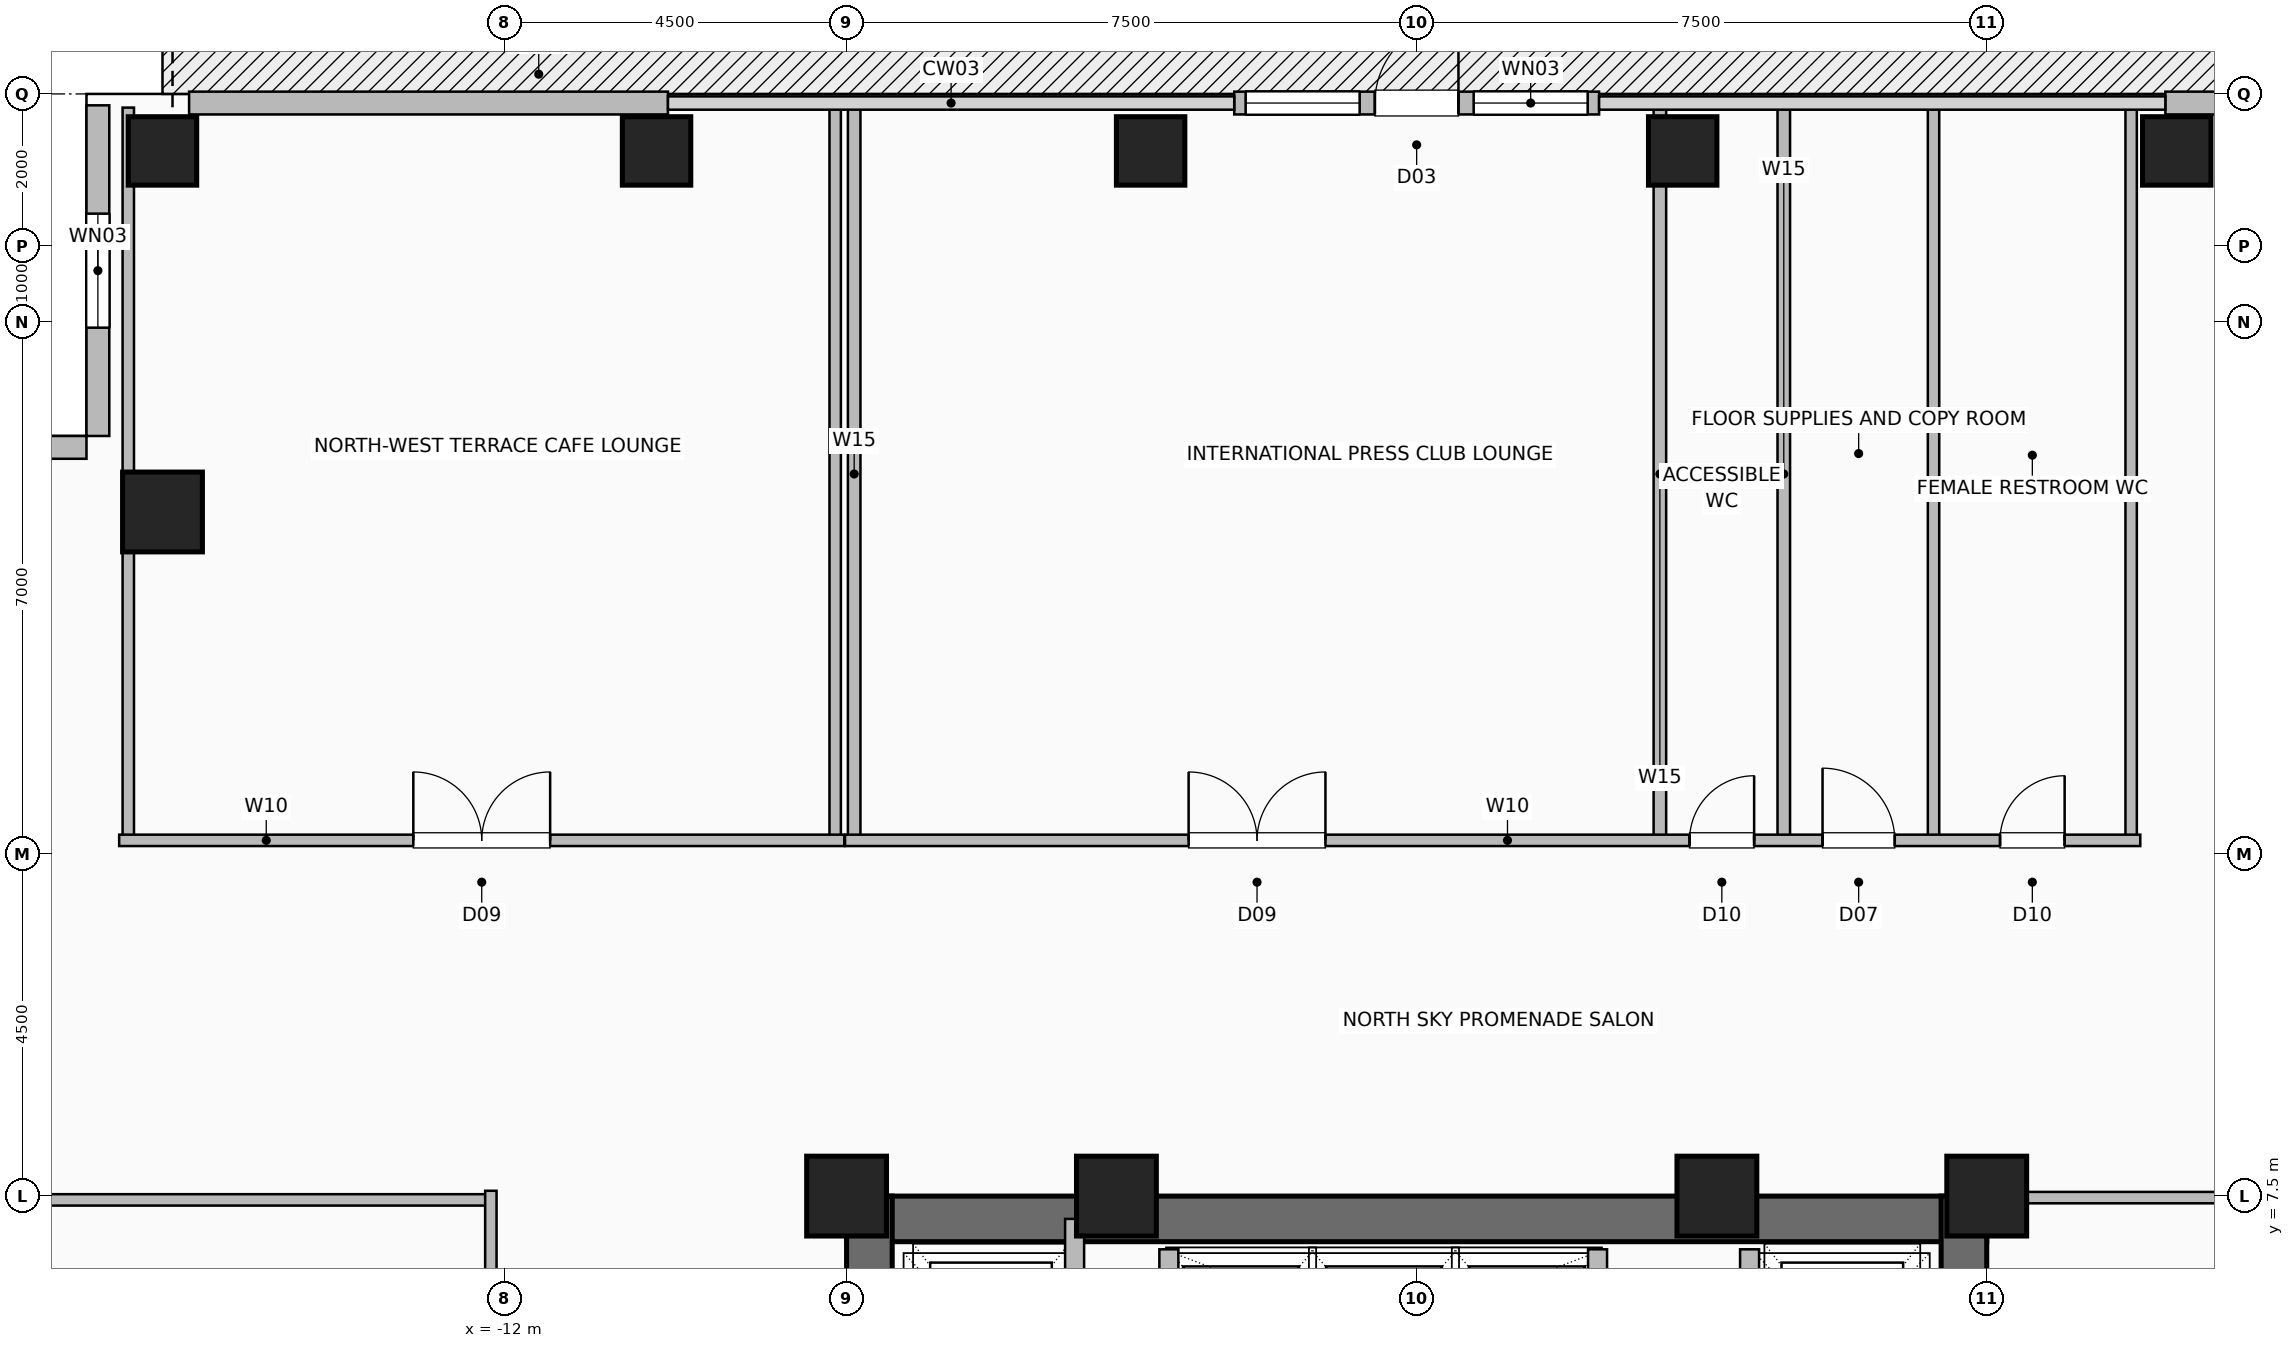
"""IFC4 building model, lengths in metres.
Left out: names, types, materials, properties, quantities, classifications, styles, units other than length and angle.
Written with IfcOpenShell. Run it as: python <this file> out.ifc"""

import sys

from ifc_helpers import new_model, si_unit, direction, frame, frame_2d, origin, origin_2d, place, context, subcontext, project, spatial, rectangle, hollow_rectangle, extrude, element, fill, save


model = new_model("IFC4")
c1 = context("Model", 3, precision=1e-05, world=origin(), true_north=direction((0.0, 1.0)))
c2 = subcontext(c1, "Body", "Model", "MODEL_VIEW")
j1 = project(units=[si_unit("LENGTHUNIT", "METRE"), si_unit("PLANEANGLEUNIT", "RADIAN")], contexts=[c1])
p1 = place(None, origin())
s1 = spatial("IfcSite", under=j1, at=p1, CompositionType="ELEMENT")
p2 = place(p1, origin())
s2 = spatial("IfcBuilding", under=s1, at=p2, CompositionType="ELEMENT")
p3 = place(p2, frame((0.0, 0.0, 122.8)))
s3 = spatial("IfcBuildingStorey", under=s2, at=p3, CompositionType="ELEMENT", Elevation=122.8)
for number, where, z_axis, x_axis in (
    (1, (7.5, 7.5, 0.0), (0.0, 0.0, 1.0), (1.0, 0.0, 0.0)),
    (2, (3.95, 7.5, 0.0), (0.0, 0.0, 1.0), (1.0, 0.0, 0.0)),
    (3, (-3.95, 7.5, 0.0), (0.0, 0.0, 1.0), (1.0, 0.0, 0.0)),
    (4, (-7.5, 7.5, 0.0), (0.0, 0.0, 1.0), (1.0, 0.0, 0.0)),
):
    element("IfcColumn", number, at=place(p3, frame(where, z_axis=z_axis, x_axis=x_axis)), inside=s3, PredefinedType="COLUMN", context=c2, shape_type="SweptSolid", body=[
        extrude(hollow_rectangle(XDim=1.05, YDim=1.05, WallThickness=0.05, at=origin_2d()), origin(), (0.0, 0.0, 1.0), 3.6),
    ])
for number, where, z_axis, x_axis in (
    (5, (-16.5, 21.25, 0.0), (0.0, 0.0, 1.0), (1.0, 0.0, 0.0)),
    (6, (-10.0, 21.25, 0.0), (0.0, 0.0, 1.0), (1.0, 0.0, 0.0)),
    (7, (-3.5, 21.25, 0.0), (0.0, 0.0, 1.0), (1.0, 0.0, 0.0)),
    (8, (3.5, 21.25, 0.0), (0.0, 0.0, 1.0), (1.0, 0.0, 0.0)),
    (9, (10.0, 21.25, 0.0), (0.0, 0.0, 1.0), (1.0, 0.0, 0.0)),
):
    element("IfcColumn", number, at=place(p3, frame(where, z_axis=z_axis, x_axis=x_axis)), inside=s3, PredefinedType="COLUMN", context=c2, shape_type="SweptSolid", body=[
        extrude(hollow_rectangle(XDim=0.9, YDim=0.9, WallThickness=0.045, at=origin_2d()), origin(), (0.0, 0.0, 1.0), 3.6),
    ])
p4 = place(p3, frame((-16.5, 16.5, 0.0), z_axis=(0.0, 0.0, 1.0), x_axis=(1.0, 0.0, 0.0)))
e10 = element("IfcColumn", 10, at=p4, inside=s3, PredefinedType="COLUMN", context=c2, shape_type="SweptSolid", body=[
    extrude(hollow_rectangle(XDim=1.05, YDim=1.05, WallThickness=0.05, at=origin_2d()), origin(), (0.0, 0.0, 1.0), 3.6),
])
for number, where, z_axis, x_axis in (
    (11, (-16.15, 21.88, 0.0), (0.0, 0.0, 1.0), (1.0, 0.0, 0.0)),
    (12, (9.85, 21.88, 0.0), (0.0, 0.0, 1.0), (1.0, 0.0, 0.0)),
):
    element("IfcWall", number, at=place(p3, frame(where, z_axis=z_axis, x_axis=x_axis)), inside=s3, PredefinedType="SOLIDWALL", context=c2, shape_type="SweptSolid", body=[
        extrude(rectangle(XDim=6.3, YDim=0.3, at=frame_2d((3.15, 0.0))), origin(), (0.0, 0.0, 1.0), 3.36),
    ])
p5 = place(p3, frame((-2.4, 21.88, 0.0), z_axis=(0.0, 0.0, 1.0), x_axis=(1.0, 0.0, 0.0)))
e13 = element("IfcWall", 13, at=p5, inside=s3, PredefinedType="SOLIDWALL", context=c2, shape_type="SweptSolid", body=[
    extrude(rectangle(XDim=4.8, YDim=0.3, at=frame_2d((2.4, 0.0))), origin(), (0.0, 0.0, 1.0), 3.36),
])
p6 = place(p5, frame((1.85, 0.0, 0.0)))
e14 = element("IfcOpeningElement", 14, at=p6, cuts=e13, PredefinedType="OPENING", context=c2, shape_type="SweptSolid", body=[
    extrude(rectangle(XDim=1.1, YDim=2.2, at=frame_2d((0.55, 1.1))), frame((0.0, 0.16, 0.0), z_axis=(0.0, -1.0, 0.0), x_axis=(1.0, 0.0, 0.0)), (0.0, 0.0, 1.0), 0.32),
])
p7 = place(p5, frame((0.15, 0.0, 0.85)))
e15 = element("IfcOpeningElement", 15, at=p7, cuts=e13, PredefinedType="OPENING", context=c2, shape_type="SweptSolid", body=[
    extrude(rectangle(XDim=1.5, YDim=1.8, at=frame_2d((0.75, 0.9))), frame((0.0, 0.16, 0.0), z_axis=(0.0, -1.0, 0.0), x_axis=(1.0, 0.0, 0.0)), (0.0, 0.0, 1.0), 0.32),
])
p8 = place(p5, frame((3.15, 0.0, 0.85)))
e16 = element("IfcOpeningElement", 16, at=p8, cuts=e13, PredefinedType="OPENING", context=c2, shape_type="SweptSolid", body=[
    extrude(rectangle(XDim=1.5, YDim=1.8, at=frame_2d((0.75, 0.9))), frame((0.0, 0.16, 0.0), z_axis=(0.0, -1.0, 0.0), x_axis=(1.0, 0.0, 0.0)), (0.0, 0.0, 1.0), 0.32),
])
p9 = place(p3, frame((-17.35, 21.85, 0.0), z_axis=(0.0, 0.0, 1.0), x_axis=(0.0, -1.0, 0.0)))
e17 = element("IfcWall", 17, at=p9, inside=s3, PredefinedType="SOLIDWALL", context=c2, shape_type="SweptSolid", body=[
    extrude(rectangle(XDim=4.35, YDim=0.3, at=frame_2d((2.175, 0.0))), origin(), (0.0, 0.0, 1.0), 3.36),
])
p10 = place(p9, frame((1.425, 0.0, 0.9)))
e18 = element("IfcOpeningElement", 18, at=p10, cuts=e17, PredefinedType="OPENING", context=c2, shape_type="SweptSolid", body=[
    extrude(rectangle(XDim=1.5, YDim=1.8, at=frame_2d((0.75, 0.9))), frame((0.0, 0.16, 0.0), z_axis=(0.0, -1.0, 0.0), x_axis=(1.0, 0.0, 0.0)), (0.0, 0.0, 1.0), 0.32),
])
p11 = place(p3, frame((-21.85, 17.35, 0.0), z_axis=(0.0, 0.0, 1.0), x_axis=(1.0, 0.0, 0.0)))
e19 = element("IfcWall", 19, at=p11, inside=s3, PredefinedType="SOLIDWALL", context=c2, shape_type="SweptSolid", body=[
    extrude(rectangle(XDim=4.35, YDim=0.3, at=frame_2d((2.175, 0.0))), origin(), (0.0, 0.0, 1.0), 3.36),
])
p12 = place(p3, frame((-7.5, 7.2, 0.0), z_axis=(0.0, 0.0, 1.0), x_axis=(1.0, 0.0, 0.0)))
e20 = element("IfcWall", 20, at=p12, inside=s3, PredefinedType="SHEAR", context=c2, shape_type="SweptSolid", body=[
    extrude(rectangle(XDim=15.0, YDim=0.6, at=frame_2d((7.5, 0.0))), origin(), (0.0, 0.0, 1.0), 3.36),
])
p13 = place(p3, frame((-7.2, -7.5, 0.0), z_axis=(0.0, 0.0, 1.0), x_axis=(0.0, 1.0, 0.0)))
e21 = element("IfcWall", 21, at=p13, inside=s3, PredefinedType="SHEAR", context=c2, shape_type="SweptSolid", body=[
    extrude(rectangle(XDim=15.0, YDim=0.6, at=frame_2d((7.5, 0.0))), origin(), (0.0, 0.0, 1.0), 3.36),
])
p14 = place(p13, frame((9.5, 0.0, 0.0)))
e22 = element("IfcOpeningElement", 22, at=p14, cuts=e21, PredefinedType="OPENING", context=c2, shape_type="SweptSolid", body=[
    extrude(rectangle(XDim=1.0, YDim=2.08, at=frame_2d((0.5, 1.04))), frame((0.0, 0.31, 0.0), z_axis=(0.0, -1.0, 0.0), x_axis=(1.0, 0.0, 0.0)), (0.0, 0.0, 1.0), 0.62),
])
p15 = place(p3, frame((7.2, -7.5, 0.0), z_axis=(0.0, 0.0, 1.0), x_axis=(0.0, 1.0, 0.0)))
e23 = element("IfcWall", 23, at=p15, inside=s3, PredefinedType="SHEAR", context=c2, shape_type="SweptSolid", body=[
    extrude(rectangle(XDim=15.0, YDim=0.6, at=frame_2d((7.5, 0.0))), origin(), (0.0, 0.0, 1.0), 3.36),
])
for number, where, z_axis, x_axis in (
    (24, (-3.26, 4.58, 0.0), (0.0, 0.0, 1.0), (0.0, 1.0, 0.0)),
    (25, (2.38, 4.58, 0.0), (0.0, 0.0, 1.0), (0.0, 1.0, 0.0)),
):
    element("IfcWall", number, at=place(p3, frame(where, z_axis=z_axis, x_axis=x_axis)), inside=s3, PredefinedType="SHEAR", context=c2, shape_type="SweptSolid", body=[
        extrude(rectangle(XDim=2.22, YDim=0.25, at=frame_2d((1.11, 0.0))), origin(), (0.0, 0.0, 1.0), 3.36),
    ])
p16 = place(p3, frame((-4.5, 4.35, 0.0), z_axis=(0.0, 0.0, 1.0), x_axis=(0.0, 1.0, 0.0)))
e26 = element("IfcWall", 26, at=p16, inside=s3, PredefinedType="SHEAR", context=c2, shape_type="SweptSolid", body=[
    extrude(rectangle(XDim=2.85, YDim=0.25, at=frame_2d((1.425, 0.0))), origin(), (0.0, 0.0, 1.0), 3.36),
])
p17 = place(p3, frame((4.38, 4.3, 0.0), z_axis=(0.0, 0.0, 1.0), x_axis=(0.0, 1.0, 0.0)))
e27 = element("IfcWall", 27, at=p17, inside=s3, PredefinedType="SHEAR", context=c2, shape_type="SweptSolid", body=[
    extrude(rectangle(XDim=2.5, YDim=0.25, at=frame_2d((1.25, 0.0))), origin(), (0.0, 0.0, 1.0), 3.36),
])
p18 = place(p17, frame((0.8, 0.0, 0.0)))
e28 = element("IfcOpeningElement", 28, at=p18, cuts=e27, PredefinedType="OPENING", context=c2, shape_type="SweptSolid", body=[
    extrude(rectangle(XDim=1.2, YDim=2.2, at=frame_2d((0.6, 1.1))), frame((0.0, 0.135, 0.0), z_axis=(0.0, -1.0, 0.0), x_axis=(1.0, 0.0, 0.0)), (0.0, 0.0, 1.0), 0.27),
])
p19 = place(p3, frame((-21.82, 7.45, 0.0), z_axis=(0.0, 0.0, 1.0), x_axis=(1.0, 0.0, 0.0)))
e29 = element("IfcWall", 29, at=p19, inside=s3, PredefinedType="PARTITIONING", context=c2, shape_type="SweptSolid", body=[
    extrude(rectangle(XDim=9.64, YDim=0.15, at=frame_2d((4.82, 0.0))), origin(), (0.0, 0.0, 1.0), 3.36),
])
p20 = place(p3, frame((-12.18, -7.57, 0.0), z_axis=(0.0, 0.0, 1.0), x_axis=(0.0, 1.0, 0.0)))
e30 = element("IfcWall", 30, at=p20, inside=s3, PredefinedType="PARTITIONING", context=c2, shape_type="SweptSolid", body=[
    extrude(rectangle(XDim=15.14, YDim=0.15, at=frame_2d((7.57, 0.0))), origin(), (0.0, 0.0, 1.0), 3.36),
])
p21 = place(p20, frame((3.695, 0.0, 0.0)))
e31 = element("IfcOpeningElement", 31, at=p21, cuts=e30, PredefinedType="OPENING", context=c2, shape_type="SweptSolid", body=[
    extrude(rectangle(XDim=1.8, YDim=2.08, at=frame_2d((0.9, 1.04))), frame((0.0, 0.085, 0.0), z_axis=(0.0, -1.0, 0.0), x_axis=(1.0, 0.0, 0.0)), (0.0, 0.0, 1.0), 0.17),
])
p22 = place(p20, frame((11.57, 0.0, 0.0)))
e32 = element("IfcOpeningElement", 32, at=p22, cuts=e30, PredefinedType="OPENING", context=c2, shape_type="SweptSolid", body=[
    extrude(rectangle(XDim=0.95, YDim=2.06, at=frame_2d((0.475, 1.03))), frame((0.0, 0.085, 0.0), z_axis=(0.0, -1.0, 0.0), x_axis=(1.0, 0.0, 0.0)), (0.0, 0.0, 1.0), 0.17),
])
for number, where, z_axis, x_axis in (
    (33, (-16.95, 12.18, 0.0), (0.0, 0.0, 1.0), (0.0, 1.0, 0.0)),
    (34, (-7.65, 12.18, 0.0), (0.0, 0.0, 1.0), (0.0, 1.0, 0.0)),
):
    element("IfcWall", number, at=place(p3, frame(where, z_axis=z_axis, x_axis=x_axis)), inside=s3, PredefinedType="PARTITIONING", context=c2, shape_type="SweptSolid", body=[
        extrude(rectangle(XDim=9.64, YDim=0.15, at=frame_2d((4.82, 0.0))), origin(), (0.0, 0.0, 1.0), 3.36),
    ])
p23 = place(p3, frame((-17.07, 12.18, 0.0), z_axis=(0.0, 0.0, 1.0), x_axis=(1.0, 0.0, 0.0)))
e35 = element("IfcWall", 35, at=p23, inside=s3, PredefinedType="PARTITIONING", context=c2, shape_type="SweptSolid", body=[
    extrude(rectangle(XDim=9.54, YDim=0.15, at=frame_2d((4.77, 0.0))), origin(), (0.0, 0.0, 1.0), 3.36),
])
p24 = place(p23, frame((3.87, 0.0, 0.0)))
e36 = element("IfcOpeningElement", 36, at=p24, cuts=e35, PredefinedType="OPENING", context=c2, shape_type="SweptSolid", body=[
    extrude(rectangle(XDim=1.8, YDim=2.08, at=frame_2d((0.9, 1.04))), frame((0.0, 0.085, 0.0), z_axis=(0.0, -1.0, 0.0), x_axis=(1.0, 0.0, 0.0)), (0.0, 0.0, 1.0), 0.17),
])
for number, where, z_axis, x_axis in (
    (37, (4.83, 12.18, 0.0), (0.0, 0.0, 1.0), (0.0, 1.0, 0.0)),
    (38, (-7.4, 12.18, 0.0), (0.0, 0.0, 1.0), (0.0, 1.0, 0.0)),
    (39, (3.2, 12.18, 0.0), (0.0, 0.0, 1.0), (0.0, 1.0, 0.0)),
):
    element("IfcWall", number, at=place(p3, frame(where, z_axis=z_axis, x_axis=x_axis)), inside=s3, PredefinedType="PLUMBINGWALL", context=c2, shape_type="SweptSolid", body=[
        extrude(rectangle(XDim=9.64, YDim=0.165, at=frame_2d((4.82, 0.0))), origin(), (0.0, 0.0, 1.0), 3.36),
    ])
for number, where, z_axis, x_axis in (
    (40, (6.8, 12.18, 0.0), (0.0, 0.0, 1.0), (0.0, 1.0, 0.0)),
    (41, (9.4, 12.18, 0.0), (0.0, 0.0, 1.0), (0.0, 1.0, 0.0)),
):
    element("IfcWall", number, at=place(p3, frame(where, z_axis=z_axis, x_axis=x_axis)), inside=s3, PredefinedType="PARTITIONING", context=c2, shape_type="SweptSolid", body=[
        extrude(rectangle(XDim=9.64, YDim=0.15, at=frame_2d((4.82, 0.0))), origin(), (0.0, 0.0, 1.0), 3.36),
    ])
p25 = place(p3, frame((-7.52, 12.18, 0.0), z_axis=(0.0, 0.0, 1.0), x_axis=(1.0, 0.0, 0.0)))
e42 = element("IfcWall", 42, at=p25, inside=s3, PredefinedType="PARTITIONING", context=c2, shape_type="SweptSolid", body=[
    extrude(rectangle(XDim=17.04, YDim=0.15, at=frame_2d((8.52, 0.0))), origin(), (0.0, 0.0, 1.0), 3.36),
])
p26 = place(p25, frame((4.52, 0.0, 0.0)))
e43 = element("IfcOpeningElement", 43, at=p26, cuts=e42, PredefinedType="OPENING", context=c2, shape_type="SweptSolid", body=[
    extrude(rectangle(XDim=1.8, YDim=2.08, at=frame_2d((0.9, 1.04))), frame((0.0, 0.085, 0.0), z_axis=(0.0, -1.0, 0.0), x_axis=(1.0, 0.0, 0.0)), (0.0, 0.0, 1.0), 0.17),
])
p27 = place(p25, frame((11.11, 0.0, 0.0)))
e44 = element("IfcOpeningElement", 44, at=p27, cuts=e42, PredefinedType="OPENING", context=c2, shape_type="SweptSolid", body=[
    extrude(rectangle(XDim=0.85, YDim=2.05, at=frame_2d((0.425, 1.025))), frame((0.0, 0.085, 0.0), z_axis=(0.0, -1.0, 0.0), x_axis=(1.0, 0.0, 0.0)), (0.0, 0.0, 1.0), 0.17),
])
p28 = place(p25, frame((12.86, 0.0, 0.0)))
e45 = element("IfcOpeningElement", 45, at=p28, cuts=e42, PredefinedType="OPENING", context=c2, shape_type="SweptSolid", body=[
    extrude(rectangle(XDim=0.95, YDim=2.06, at=frame_2d((0.475, 1.03))), frame((0.0, 0.085, 0.0), z_axis=(0.0, -1.0, 0.0), x_axis=(1.0, 0.0, 0.0)), (0.0, 0.0, 1.0), 0.17),
])
p29 = place(p25, frame((15.195, 0.0, 0.0)))
e46 = element("IfcOpeningElement", 46, at=p29, cuts=e42, PredefinedType="OPENING", context=c2, shape_type="SweptSolid", body=[
    extrude(rectangle(XDim=0.85, YDim=2.05, at=frame_2d((0.425, 1.025))), frame((0.0, 0.085, 0.0), z_axis=(0.0, -1.0, 0.0), x_axis=(1.0, 0.0, 0.0)), (0.0, 0.0, 1.0), 0.17),
])
p30 = place(p3, frame((7.6, 7.48, 0.0), z_axis=(0.0, 0.0, 1.0), x_axis=(1.0, 0.0, 0.0)))
e47 = element("IfcWall", 47, at=p30, inside=s3, PredefinedType="PARTITIONING", context=c2, shape_type="SweptSolid", body=[
    extrude(rectangle(XDim=14.22, YDim=0.15, at=frame_2d((7.11, 0.0))), origin(), (0.0, 0.0, 1.0), 3.36),
])
p31 = place(p6, origin())
e48 = element("IfcDoor", 48, at=p31, inside=s3, OperationType="SINGLE_SWING_RIGHT", PredefinedType="DOOR", context=c2, shape_type="SweptSolid", body=[
    extrude(rectangle(XDim=1.1, YDim=2.2, at=frame_2d((0.55, 1.1))), frame((0.0, 0.025, 0.0), z_axis=(0.0, -1.0, 0.0), x_axis=(1.0, 0.0, 0.0)), (0.0, 0.0, 1.0), 0.05),
])
fill(e14, e48)
p32 = place(p7, origin())
e49 = element("IfcWindow", 49, at=p32, inside=s3, PartitioningType="SINGLE_PANEL", PredefinedType="WINDOW", context=c2, shape_type="SweptSolid", body=[
    extrude(rectangle(XDim=1.5, YDim=1.8, at=frame_2d((0.75, 0.9))), frame((0.0, 0.03, 0.0), z_axis=(0.0, -1.0, 0.0), x_axis=(1.0, 0.0, 0.0)), (0.0, 0.0, 1.0), 0.06),
])
fill(e15, e49)
p33 = place(p8, origin())
e50 = element("IfcWindow", 50, at=p33, inside=s3, PartitioningType="SINGLE_PANEL", PredefinedType="WINDOW", context=c2, shape_type="SweptSolid", body=[
    extrude(rectangle(XDim=1.5, YDim=1.8, at=frame_2d((0.75, 0.9))), frame((0.0, 0.03, 0.0), z_axis=(0.0, -1.0, 0.0), x_axis=(1.0, 0.0, 0.0)), (0.0, 0.0, 1.0), 0.06),
])
fill(e16, e50)
p34 = place(p10, origin())
e51 = element("IfcWindow", 51, at=p34, inside=s3, PartitioningType="SINGLE_PANEL", PredefinedType="WINDOW", context=c2, shape_type="SweptSolid", body=[
    extrude(rectangle(XDim=1.5, YDim=1.8, at=frame_2d((0.75, 0.9))), frame((0.0, 0.03, 0.0), z_axis=(0.0, -1.0, 0.0), x_axis=(1.0, 0.0, 0.0)), (0.0, 0.0, 1.0), 0.06),
])
fill(e18, e51)
p35 = place(p24, origin())
e52 = element("IfcDoor", 52, at=p35, inside=s3, OperationType="DOUBLE_DOOR_SINGLE_SWING", PredefinedType="DOOR", context=c2, shape_type="SweptSolid", body=[
    extrude(rectangle(XDim=1.8, YDim=2.08, at=frame_2d((0.9, 1.04))), frame((0.0, 0.025, 0.0), z_axis=(0.0, -1.0, 0.0), x_axis=(1.0, 0.0, 0.0)), (0.0, 0.0, 1.0), 0.05),
])
fill(e36, e52)
p36 = place(p26, origin())
e53 = element("IfcDoor", 53, at=p36, inside=s3, OperationType="DOUBLE_DOOR_SINGLE_SWING", PredefinedType="DOOR", context=c2, shape_type="SweptSolid", body=[
    extrude(rectangle(XDim=1.8, YDim=2.08, at=frame_2d((0.9, 1.04))), frame((0.0, 0.025, 0.0), z_axis=(0.0, -1.0, 0.0), x_axis=(1.0, 0.0, 0.0)), (0.0, 0.0, 1.0), 0.05),
])
fill(e43, e53)
p37 = place(p27, origin())
e54 = element("IfcDoor", 54, at=p37, inside=s3, OperationType="SINGLE_SWING_RIGHT", PredefinedType="DOOR", context=c2, shape_type="SweptSolid", body=[
    extrude(rectangle(XDim=0.85, YDim=2.05, at=frame_2d((0.425, 1.025))), frame((0.0, 0.025, 0.0), z_axis=(0.0, -1.0, 0.0), x_axis=(1.0, 0.0, 0.0)), (0.0, 0.0, 1.0), 0.05),
])
fill(e44, e54)
p38 = place(p28, origin())
e55 = element("IfcDoor", 55, at=p38, inside=s3, OperationType="SINGLE_SWING_LEFT", PredefinedType="DOOR", context=c2, shape_type="SweptSolid", body=[
    extrude(rectangle(XDim=0.95, YDim=2.06, at=frame_2d((0.475, 1.03))), frame((0.0, 0.025, 0.0), z_axis=(0.0, -1.0, 0.0), x_axis=(1.0, 0.0, 0.0)), (0.0, 0.0, 1.0), 0.05),
])
fill(e45, e55)
p39 = place(p29, origin())
e56 = element("IfcDoor", 56, at=p39, inside=s3, OperationType="SINGLE_SWING_RIGHT", PredefinedType="DOOR", context=c2, shape_type="SweptSolid", body=[
    extrude(rectangle(XDim=0.85, YDim=2.05, at=frame_2d((0.425, 1.025))), frame((0.0, 0.025, 0.0), z_axis=(0.0, -1.0, 0.0), x_axis=(1.0, 0.0, 0.0)), (0.0, 0.0, 1.0), 0.05),
])
fill(e46, e56)
save(model, sys.argv[1])
